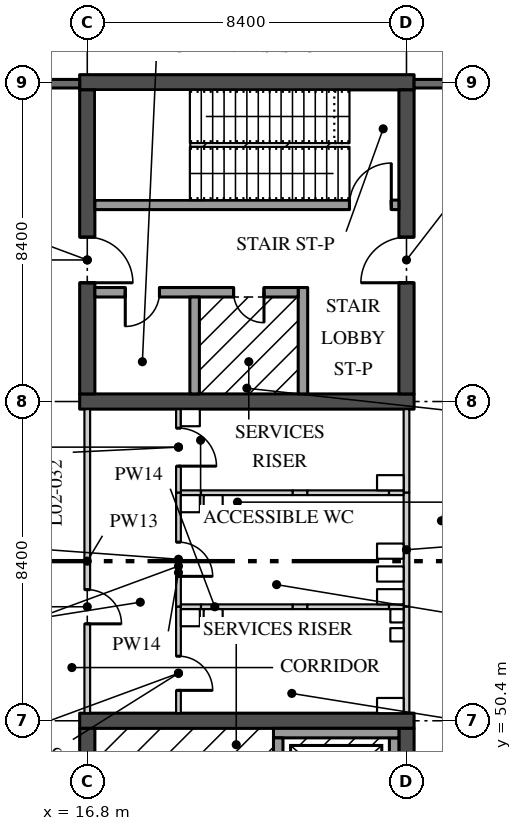
"""IFC4 building model, lengths in metres.
Left out: names, types, materials, properties, quantities, classifications, styles, units other than length and angle.
Written with IfcOpenShell. Run it as: python <this file> out.ifc"""

import sys

from ifc_helpers import new_model, si_unit, direction, frame, frame_2d, origin, place, context, subcontext, project, spatial, rectangle, extrude, element, fill, save


model = new_model("IFC4")
c1 = context("Model", 3, precision=1e-05, world=origin(), true_north=direction((0.0, 1.0)))
c2 = subcontext(c1, "Body", "Model", "MODEL_VIEW")
j1 = project(units=[si_unit("LENGTHUNIT", "METRE"), si_unit("PLANEANGLEUNIT", "RADIAN")], contexts=[c1])
p1 = place(None, origin())
s1 = spatial("IfcSite", under=j1, at=p1, CompositionType="ELEMENT")
p2 = place(p1, origin())
s2 = spatial("IfcBuilding", under=s1, at=p2, CompositionType="ELEMENT")
p3 = place(p2, frame((0.0, 0.0, 9.9)))
s3 = spatial("IfcBuildingStorey", under=s2, at=p3, CompositionType="ELEMENT", Elevation=9.9)
p4 = place(p3, frame((16.6, 50.4, 0.0), z_axis=(0.0, 0.0, 1.0), x_axis=(1.0, 0.0, 0.0)))
e1 = element("IfcWall", 1, at=p4, inside=s3, PredefinedType="SHEAR", context=c2, shape_type="SweptSolid", body=[
    extrude(rectangle(XDim=8.8, YDim=0.4, at=frame_2d((4.4, 0.0))), origin(), (0.0, 0.0, 1.0), 4.37),
])
p5 = place(p3, frame((16.8, 42.2, 0.0), z_axis=(0.0, 0.0, 1.0), x_axis=(0.0, 1.0, 0.0)))
e2 = element("IfcWall", 2, at=p5, inside=s3, PredefinedType="SHEAR", context=c2, shape_type="SweptSolid", body=[
    extrude(rectangle(XDim=8.0, YDim=0.4, at=frame_2d((4.0, 0.0))), origin(), (0.0, 0.0, 1.0), 4.37),
])
p6 = place(p5, frame((3.55, 0.0, 0.0)))
e3 = element("IfcOpeningElement", 3, at=p6, cuts=e2, PredefinedType="OPENING", context=c2, shape_type="SweptSolid", body=[
    extrude(rectangle(XDim=1.2, YDim=2.1, at=frame_2d((0.6, 1.05))), frame((0.0, 0.21, 0.0), z_axis=(0.0, -1.0, 0.0), x_axis=(1.0, 0.0, 0.0)), (0.0, 0.0, 1.0), 0.42),
])
p7 = place(p5, frame((0.8, 0.0, 0.0)))
e4 = element("IfcOpeningElement", 4, at=p7, cuts=e2, PredefinedType="OPENING", context=c2, shape_type="SweptSolid", body=[
    extrude(rectangle(XDim=1.2, YDim=2.1, at=frame_2d((0.6, 1.05))), frame((0.0, 0.21, 0.0), z_axis=(0.0, -1.0, 0.0), x_axis=(1.0, 0.0, 0.0)), (0.0, 0.0, 1.0), 0.42),
])
p8 = place(p3, frame((25.2, 42.2, 0.0), z_axis=(0.0, 0.0, 1.0), x_axis=(0.0, 1.0, 0.0)))
e5 = element("IfcWall", 5, at=p8, inside=s3, PredefinedType="SHEAR", context=c2, shape_type="SweptSolid", body=[
    extrude(rectangle(XDim=8.0, YDim=0.4, at=frame_2d((4.0, 0.0))), origin(), (0.0, 0.0, 1.0), 4.37),
])
p9 = place(p8, frame((3.55, 0.0, 0.0)))
e6 = element("IfcOpeningElement", 6, at=p9, cuts=e5, PredefinedType="OPENING", context=c2, shape_type="SweptSolid", body=[
    extrude(rectangle(XDim=1.2, YDim=2.1, at=frame_2d((0.6, 1.05))), frame((0.0, 0.21, 0.0), z_axis=(0.0, -1.0, 0.0), x_axis=(1.0, 0.0, 0.0)), (0.0, 0.0, 1.0), 0.42),
])
for number, where, z_axis, x_axis in (
    (7, (16.6, 58.8, 0.0), (0.0, 0.0, 1.0), (1.0, 0.0, 0.0)),
    (8, (16.6, 67.2, 0.0), (0.0, 0.0, 1.0), (1.0, 0.0, 0.0)),
):
    element("IfcWall", number, at=place(p3, frame(where, z_axis=z_axis, x_axis=x_axis)), inside=s3, PredefinedType="SHEAR", context=c2, shape_type="SweptSolid", body=[
        extrude(rectangle(XDim=8.8, YDim=0.4, at=frame_2d((4.4, 0.0))), origin(), (0.0, 0.0, 1.0), 4.37),
    ])
p10 = place(p3, frame((16.8, 59.0, 0.0), z_axis=(0.0, 0.0, 1.0), x_axis=(0.0, 1.0, 0.0)))
e9 = element("IfcWall", 9, at=p10, inside=s3, PredefinedType="SHEAR", context=c2, shape_type="SweptSolid", body=[
    extrude(rectangle(XDim=8.0, YDim=0.4, at=frame_2d((4.0, 0.0))), origin(), (0.0, 0.0, 1.0), 4.37),
])
p11 = place(p10, frame((2.925, 0.0, 0.0)))
e10 = element("IfcOpeningElement", 10, at=p11, cuts=e9, PredefinedType="OPENING", context=c2, shape_type="SweptSolid", body=[
    extrude(rectangle(XDim=1.2, YDim=2.1, at=frame_2d((0.6, 1.05))), frame((0.0, 0.21, 0.0), z_axis=(0.0, -1.0, 0.0), x_axis=(1.0, 0.0, 0.0)), (0.0, 0.0, 1.0), 0.42),
])
p12 = place(p3, frame((25.2, 59.0, 0.0), z_axis=(0.0, 0.0, 1.0), x_axis=(0.0, 1.0, 0.0)))
e11 = element("IfcWall", 11, at=p12, inside=s3, PredefinedType="SHEAR", context=c2, shape_type="SweptSolid", body=[
    extrude(rectangle(XDim=8.0, YDim=0.4, at=frame_2d((4.0, 0.0))), origin(), (0.0, 0.0, 1.0), 4.37),
])
p13 = place(p12, frame((2.925, 0.0, 0.0)))
e12 = element("IfcOpeningElement", 12, at=p13, cuts=e11, PredefinedType="OPENING", context=c2, shape_type="SweptSolid", body=[
    extrude(rectangle(XDim=1.2, YDim=2.1, at=frame_2d((0.6, 1.05))), frame((0.0, 0.21, 0.0), z_axis=(0.0, -1.0, 0.0), x_axis=(1.0, 0.0, 0.0)), (0.0, 0.0, 1.0), 0.42),
])
p14 = place(p3, frame((25.0, 63.975, 0.0), z_axis=(0.0, 0.0, 1.0), x_axis=(-1.0, 0.0, 0.0)))
e13 = element("IfcWall", 13, at=p14, inside=s3, PredefinedType="SOLIDWALL", context=c2, shape_type="SweptSolid", body=[
    extrude(rectangle(XDim=8.0, YDim=0.25, at=frame_2d((4.0, 0.0))), origin(), (0.0, 0.0, 1.0), 4.37),
])
p15 = place(p14, frame((0.2, 0.0, 0.0)))
e14 = element("IfcOpeningElement", 14, at=p15, cuts=e13, PredefinedType="OPENING", context=c2, shape_type="SweptSolid", body=[
    extrude(rectangle(XDim=1.1, YDim=2.1, at=frame_2d((0.55, 1.05))), frame((0.0, 0.135, 0.0), z_axis=(0.0, -1.0, 0.0), x_axis=(1.0, 0.0, 0.0)), (0.0, 0.0, 1.0), 0.27),
])
p16 = place(p3, frame((22.475, 61.8, 0.0), z_axis=(0.0, 0.0, 1.0), x_axis=(0.0, -1.0, 0.0)))
e15 = element("IfcWall", 15, at=p16, inside=s3, PredefinedType="SOLIDWALL", context=c2, shape_type="SweptSolid", body=[
    extrude(rectangle(XDim=2.8, YDim=0.25, at=frame_2d((1.4, 0.0))), origin(), (0.0, 0.0, 1.0), 4.37),
])
p17 = place(p3, frame((22.35, 61.675, 0.0), z_axis=(0.0, 0.0, 1.0), x_axis=(-1.0, 0.0, 0.0)))
e16 = element("IfcWall", 16, at=p17, inside=s3, PredefinedType="SOLIDWALL", context=c2, shape_type="SweptSolid", body=[
    extrude(rectangle(XDim=5.35, YDim=0.25, at=frame_2d((2.675, 0.0))), origin(), (0.0, 0.0, 1.0), 4.37),
])
p18 = place(p17, frame((3.65, 0.0, 0.0)))
e17 = element("IfcOpeningElement", 17, at=p18, cuts=e16, PredefinedType="OPENING", context=c2, shape_type="SweptSolid", body=[
    extrude(rectangle(XDim=0.9, YDim=2.1, at=frame_2d((0.45, 1.05))), frame((0.0, 0.135, 0.0), z_axis=(0.0, -1.0, 0.0), x_axis=(1.0, 0.0, 0.0)), (0.0, 0.0, 1.0), 0.27),
])
p19 = place(p17, frame((0.9, 0.0, 0.0)))
e18 = element("IfcOpeningElement", 18, at=p19, cuts=e16, PredefinedType="OPENING", context=c2, shape_type="SweptSolid", body=[
    extrude(rectangle(XDim=0.8, YDim=2.1, at=frame_2d((0.4, 1.05))), frame((0.0, 0.135, 0.0), z_axis=(0.0, -1.0, 0.0), x_axis=(1.0, 0.0, 0.0)), (0.0, 0.0, 1.0), 0.27),
])
p20 = place(p3, frame((19.625, 61.55, 0.0), z_axis=(0.0, 0.0, 1.0), x_axis=(0.0, -1.0, 0.0)))
e19 = element("IfcWall", 19, at=p20, inside=s3, PredefinedType="SOLIDWALL", context=c2, shape_type="SweptSolid", body=[
    extrude(rectangle(XDim=2.55, YDim=0.25, at=frame_2d((1.275, 0.0))), origin(), (0.0, 0.0, 1.0), 4.37),
])
p21 = place(p3, frame((24.875, 47.65, 0.0), z_axis=(0.0, 0.0, 1.0), x_axis=(0.0, 1.0, 0.0)))
e20 = element("IfcWall", 20, at=p21, inside=s3, PredefinedType="SOLIDWALL", context=c2, shape_type="SweptSolid", body=[
    extrude(rectangle(XDim=2.3, YDim=0.25, at=frame_2d((1.15, 0.0))), origin(), (0.0, 0.0, 1.0), 4.37),
])
p22 = place(p3, frame((21.7, 50.075, 0.0), z_axis=(0.0, 0.0, 1.0), x_axis=(1.0, 0.0, 0.0)))
e21 = element("IfcWall", 21, at=p22, inside=s3, PredefinedType="SOLIDWALL", context=c2, shape_type="SweptSolid", body=[
    extrude(rectangle(XDim=3.3, YDim=0.25, at=frame_2d((1.65, 0.0))), origin(), (0.0, 0.0, 1.0), 4.37),
])
p23 = place(p3, frame((21.825, 47.65, 0.0), z_axis=(0.0, 0.0, 1.0), x_axis=(0.0, 1.0, 0.0)))
e22 = element("IfcWall", 22, at=p23, inside=s3, PredefinedType="SOLIDWALL", context=c2, shape_type="SweptSolid", body=[
    extrude(rectangle(XDim=2.3, YDim=0.25, at=frame_2d((1.15, 0.0))), origin(), (0.0, 0.0, 1.0), 4.37),
])
p24 = place(p3, frame((25.2, 56.4, 0.0), z_axis=(0.0, 0.0, 1.0), x_axis=(0.0, 1.0, 0.0)))
e23 = element("IfcWall", 23, at=p24, inside=s3, PredefinedType="PARTITIONING", context=c2, shape_type="SweptSolid", body=[
    extrude(rectangle(XDim=2.2, YDim=0.15, at=frame_2d((1.1, 0.0))), origin(), (0.0, 0.0, 1.0), 3.746),
])
p25 = place(p3, frame((25.2, 53.4, 0.0), z_axis=(0.0, 0.0, 1.0), x_axis=(0.0, 1.0, 0.0)))
e24 = element("IfcWall", 24, at=p25, inside=s3, PredefinedType="PARTITIONING", context=c2, shape_type="SweptSolid", body=[
    extrude(rectangle(XDim=3.0, YDim=0.15, at=frame_2d((1.5, 0.0))), origin(), (0.0, 0.0, 1.0), 3.746),
])
p26 = place(p3, frame((25.2, 50.6, 0.0), z_axis=(0.0, 0.0, 1.0), x_axis=(0.0, 1.0, 0.0)))
e25 = element("IfcWall", 25, at=p26, inside=s3, PredefinedType="PARTITIONING", context=c2, shape_type="SweptSolid", body=[
    extrude(rectangle(XDim=2.8, YDim=0.15, at=frame_2d((1.4, 0.0))), origin(), (0.0, 0.0, 1.0), 3.746),
])
p27 = place(p3, frame((16.8, 50.6, 0.0), z_axis=(0.0, 0.0, 1.0), x_axis=(0.0, 1.0, 0.0)))
e26 = element("IfcWall", 26, at=p27, inside=s3, PredefinedType="PARTITIONING", context=c2, shape_type="SweptSolid", body=[
    extrude(rectangle(XDim=8.0, YDim=0.15, at=frame_2d((4.0, 0.0))), origin(), (0.0, 0.0, 1.0), 3.746),
])
p28 = place(p27, frame((2.35, 0.0, 0.0)))
e27 = element("IfcOpeningElement", 27, at=p28, cuts=e26, PredefinedType="OPENING", context=c2, shape_type="SweptSolid", body=[
    extrude(rectangle(XDim=0.9, YDim=2.1, at=frame_2d((0.45, 1.05))), frame((0.0, 0.085, 0.0), z_axis=(0.0, -1.0, 0.0), x_axis=(1.0, 0.0, 0.0)), (0.0, 0.0, 1.0), 0.17),
])
p29 = place(p3, frame((19.262, 56.4, 0.0), z_axis=(0.0, 0.0, 1.0), x_axis=(1.0, 0.0, 0.0)))
e28 = element("IfcWall", 28, at=p29, inside=s3, PredefinedType="PARTITIONING", context=c2, shape_type="SweptSolid", body=[
    extrude(rectangle(XDim=0.531, YDim=0.125, at=frame_2d((0.266, 0.0))), origin(), (0.0, 0.0, 1.0), 3.895),
])
p30 = place(p3, frame((19.793, 56.4, 0.0), z_axis=(0.0, 0.0, 1.0), x_axis=(1.0, 0.0, 0.0)))
e29 = element("IfcWall", 29, at=p30, inside=s3, PredefinedType="PARTITIONING", context=c2, shape_type="SweptSolid", body=[
    extrude(rectangle(XDim=2.414, YDim=0.125, at=frame_2d((1.207, 0.0))), origin(), (0.0, 0.0, 1.0), 4.37),
])
p31 = place(p3, frame((22.207, 56.4, 0.0), z_axis=(0.0, 0.0, 1.0), x_axis=(1.0, 0.0, 0.0)))
e30 = element("IfcWall", 30, at=p31, inside=s3, PredefinedType="PARTITIONING", context=c2, shape_type="SweptSolid", body=[
    extrude(rectangle(XDim=0.385, YDim=0.125, at=frame_2d((0.192, 0.0))), origin(), (0.0, 0.0, 1.0), 3.895),
])
p32 = place(p3, frame((22.592, 56.4, 0.0), z_axis=(0.0, 0.0, 1.0), x_axis=(1.0, 0.0, 0.0)))
e31 = element("IfcWall", 31, at=p32, inside=s3, PredefinedType="PARTITIONING", context=c2, shape_type="SweptSolid", body=[
    extrude(rectangle(XDim=2.148, YDim=0.125, at=frame_2d((1.074, 0.0))), origin(), (0.0, 0.0, 1.0), 4.37),
])
p33 = place(p3, frame((24.74, 56.4, 0.0), z_axis=(0.0, 0.0, 1.0), x_axis=(1.0, 0.0, 0.0)))
e32 = element("IfcWall", 32, at=p33, inside=s3, PredefinedType="PARTITIONING", context=c2, shape_type="SweptSolid", body=[
    extrude(rectangle(XDim=0.385, YDim=0.125, at=frame_2d((0.192, 0.0))), origin(), (0.0, 0.0, 1.0), 3.746),
])
p34 = place(p3, frame((19.2, 56.4, 0.0), z_axis=(0.0, 0.0, 1.0), x_axis=(0.0, 1.0, 0.0)))
e33 = element("IfcWall", 33, at=p34, inside=s3, PredefinedType="PARTITIONING", context=c2, shape_type="SweptSolid", body=[
    extrude(rectangle(XDim=2.2, YDim=0.125, at=frame_2d((1.1, 0.0))), origin(), (0.0, 0.0, 1.0), 4.37),
])
p35 = place(p34, frame((0.7, 0.0, 0.0)))
e34 = element("IfcOpeningElement", 34, at=p35, cuts=e33, PredefinedType="OPENING", context=c2, shape_type="SweptSolid", body=[
    extrude(rectangle(XDim=1.0, YDim=2.1, at=frame_2d((0.5, 1.05))), frame((0.0, 0.073, 0.0), z_axis=(0.0, -1.0, 0.0), x_axis=(1.0, 0.0, 0.0)), (0.0, 0.0, 1.0), 0.145),
])
p36 = place(p3, frame((19.2, 53.4, 0.0), z_axis=(0.0, 0.0, 1.0), x_axis=(0.0, 1.0, 0.0)))
e35 = element("IfcWall", 35, at=p36, inside=s3, PredefinedType="PARTITIONING", context=c2, shape_type="SweptSolid", body=[
    extrude(rectangle(XDim=3.0, YDim=0.125, at=frame_2d((1.5, 0.0))), origin(), (0.0, 0.0, 1.0), 4.37),
])
p37 = place(p36, frame((0.8, 0.0, 0.0)))
e36 = element("IfcOpeningElement", 36, at=p37, cuts=e35, PredefinedType="OPENING", context=c2, shape_type="SweptSolid", body=[
    extrude(rectangle(XDim=0.9, YDim=2.1, at=frame_2d((0.45, 1.05))), frame((0.0, 0.073, 0.0), z_axis=(0.0, -1.0, 0.0), x_axis=(1.0, 0.0, 0.0)), (0.0, 0.0, 1.0), 0.145),
])
p38 = place(p3, frame((19.262, 53.4, 0.0), z_axis=(0.0, 0.0, 1.0), x_axis=(1.0, 0.0, 0.0)))
e37 = element("IfcWall", 37, at=p38, inside=s3, PredefinedType="PARTITIONING", context=c2, shape_type="SweptSolid", body=[
    extrude(rectangle(XDim=0.531, YDim=0.125, at=frame_2d((0.266, 0.0))), origin(), (0.0, 0.0, 1.0), 3.895),
])
p39 = place(p3, frame((19.793, 53.4, 0.0), z_axis=(0.0, 0.0, 1.0), x_axis=(1.0, 0.0, 0.0)))
e38 = element("IfcWall", 38, at=p39, inside=s3, PredefinedType="PARTITIONING", context=c2, shape_type="SweptSolid", body=[
    extrude(rectangle(XDim=2.414, YDim=0.125, at=frame_2d((1.207, 0.0))), origin(), (0.0, 0.0, 1.0), 4.37),
])
p40 = place(p3, frame((22.207, 53.4, 0.0), z_axis=(0.0, 0.0, 1.0), x_axis=(1.0, 0.0, 0.0)))
e39 = element("IfcWall", 39, at=p40, inside=s3, PredefinedType="PARTITIONING", context=c2, shape_type="SweptSolid", body=[
    extrude(rectangle(XDim=0.385, YDim=0.125, at=frame_2d((0.192, 0.0))), origin(), (0.0, 0.0, 1.0), 3.895),
])
p41 = place(p3, frame((22.592, 53.4, 0.0), z_axis=(0.0, 0.0, 1.0), x_axis=(1.0, 0.0, 0.0)))
e40 = element("IfcWall", 40, at=p41, inside=s3, PredefinedType="PARTITIONING", context=c2, shape_type="SweptSolid", body=[
    extrude(rectangle(XDim=2.148, YDim=0.125, at=frame_2d((1.074, 0.0))), origin(), (0.0, 0.0, 1.0), 4.37),
])
p42 = place(p3, frame((24.74, 53.4, 0.0), z_axis=(0.0, 0.0, 1.0), x_axis=(1.0, 0.0, 0.0)))
e41 = element("IfcWall", 41, at=p42, inside=s3, PredefinedType="PARTITIONING", context=c2, shape_type="SweptSolid", body=[
    extrude(rectangle(XDim=0.385, YDim=0.125, at=frame_2d((0.192, 0.0))), origin(), (0.0, 0.0, 1.0), 3.746),
])
p43 = place(p3, frame((19.2, 50.6, 0.0), z_axis=(0.0, 0.0, 1.0), x_axis=(0.0, 1.0, 0.0)))
e42 = element("IfcWall", 42, at=p43, inside=s3, PredefinedType="PARTITIONING", context=c2, shape_type="SweptSolid", body=[
    extrude(rectangle(XDim=2.8, YDim=0.125, at=frame_2d((1.4, 0.0))), origin(), (0.0, 0.0, 1.0), 4.37),
])
p44 = place(p43, frame((0.6, 0.0, 0.0)))
e43 = element("IfcOpeningElement", 43, at=p44, cuts=e42, PredefinedType="OPENING", context=c2, shape_type="SweptSolid", body=[
    extrude(rectangle(XDim=0.9, YDim=2.1, at=frame_2d((0.45, 1.05))), frame((0.0, 0.073, 0.0), z_axis=(0.0, -1.0, 0.0), x_axis=(1.0, 0.0, 0.0)), (0.0, 0.0, 1.0), 0.145),
])
for number, where, z_axis, x_axis in (
    (44, (33.596, 67.163, 0.0), (0.0, 0.0, 1.0), (-1.0, 0.0, 0.0)),
    (45, (16.6, 67.163, 0.0), (0.0, 0.0, 1.0), (-1.0, 0.0, 0.0)),
):
    element("IfcWall", number, at=place(p3, frame(where, z_axis=z_axis, x_axis=x_axis)), inside=s3, PredefinedType="SOLIDWALL", context=c2, shape_type="SweptSolid", body=[
        extrude(rectangle(XDim=8.196, YDim=0.225, at=frame_2d((4.098, 0.0))), origin(), (0.0, 0.0, 1.0), 3.746),
    ])
p45 = place(p18, origin())
e46 = element("IfcDoor", 46, at=p45, inside=s3, OperationType="SINGLE_SWING_LEFT", PredefinedType="DOOR", context=c2, shape_type="SweptSolid", body=[
    extrude(rectangle(XDim=0.9, YDim=2.1, at=frame_2d((0.45, 1.05))), frame((0.0, 0.035, 0.0), z_axis=(0.0, -1.0, 0.0), x_axis=(1.0, 0.0, 0.0)), (0.0, 0.0, 1.0), 0.07),
])
fill(e17, e46)
p46 = place(p11, frame((1.2, 0.0, 0.0), z_axis=(0.0, 0.0, 1.0), x_axis=(-1.0, 0.0, 0.0)))
e47 = element("IfcDoor", 47, at=p46, inside=s3, OperationType="SINGLE_SWING_LEFT", PredefinedType="DOOR", context=c2, shape_type="SweptSolid", body=[
    extrude(rectangle(XDim=1.2, YDim=2.1, at=frame_2d((0.6, 1.05))), frame((0.0, 0.035, 0.0), z_axis=(0.0, -1.0, 0.0), x_axis=(1.0, 0.0, 0.0)), (0.0, 0.0, 1.0), 0.07),
])
fill(e10, e47)
p47 = place(p13, origin())
e48 = element("IfcDoor", 48, at=p47, inside=s3, OperationType="SINGLE_SWING_RIGHT", PredefinedType="DOOR", context=c2, shape_type="SweptSolid", body=[
    extrude(rectangle(XDim=1.2, YDim=2.1, at=frame_2d((0.6, 1.05))), frame((0.0, 0.035, 0.0), z_axis=(0.0, -1.0, 0.0), x_axis=(1.0, 0.0, 0.0)), (0.0, 0.0, 1.0), 0.07),
])
fill(e12, e48)
p48 = place(p19, origin())
e49 = element("IfcDoor", 49, at=p48, inside=s3, OperationType="SINGLE_SWING_RIGHT", PredefinedType="DOOR", context=c2, shape_type="SweptSolid", body=[
    extrude(rectangle(XDim=0.8, YDim=2.1, at=frame_2d((0.4, 1.05))), frame((0.0, 0.035, 0.0), z_axis=(0.0, -1.0, 0.0), x_axis=(1.0, 0.0, 0.0)), (0.0, 0.0, 1.0), 0.07),
])
fill(e18, e49)
p49 = place(p15, frame((1.1, 0.0, 0.0), z_axis=(0.0, 0.0, 1.0), x_axis=(-1.0, 0.0, 0.0)))
e50 = element("IfcDoor", 50, at=p49, inside=s3, OperationType="SINGLE_SWING_LEFT", PredefinedType="DOOR", context=c2, shape_type="SweptSolid", body=[
    extrude(rectangle(XDim=1.1, YDim=2.1, at=frame_2d((0.55, 1.05))), frame((0.0, 0.035, 0.0), z_axis=(0.0, -1.0, 0.0), x_axis=(1.0, 0.0, 0.0)), (0.0, 0.0, 1.0), 0.07),
])
fill(e14, e50)
p50 = place(p35, frame((1.0, 0.0, 0.0), z_axis=(0.0, 0.0, 1.0), x_axis=(-1.0, 0.0, 0.0)))
e51 = element("IfcDoor", 51, at=p50, inside=s3, OperationType="SINGLE_SWING_LEFT", PredefinedType="DOOR", context=c2, shape_type="SweptSolid", body=[
    extrude(rectangle(XDim=1.0, YDim=2.1, at=frame_2d((0.5, 1.05))), frame((0.0, 0.02, 0.0), z_axis=(0.0, -1.0, 0.0), x_axis=(1.0, 0.0, 0.0)), (0.0, 0.0, 1.0), 0.04),
])
fill(e34, e51)
p51 = place(p37, frame((0.9, 0.0, 0.0), z_axis=(0.0, 0.0, 1.0), x_axis=(-1.0, 0.0, 0.0)))
e52 = element("IfcDoor", 52, at=p51, inside=s3, OperationType="SINGLE_SWING_LEFT", PredefinedType="DOOR", context=c2, shape_type="SweptSolid", body=[
    extrude(rectangle(XDim=0.9, YDim=2.1, at=frame_2d((0.45, 1.05))), frame((0.0, 0.02, 0.0), z_axis=(0.0, -1.0, 0.0), x_axis=(1.0, 0.0, 0.0)), (0.0, 0.0, 1.0), 0.04),
])
fill(e36, e52)
p52 = place(p28, frame((0.9, 0.0, 0.0), z_axis=(0.0, 0.0, 1.0), x_axis=(-1.0, 0.0, 0.0)))
e53 = element("IfcDoor", 53, at=p52, inside=s3, OperationType="SINGLE_SWING_LEFT", PredefinedType="DOOR", context=c2, shape_type="SweptSolid", body=[
    extrude(rectangle(XDim=0.9, YDim=2.1, at=frame_2d((0.45, 1.05))), frame((0.0, 0.025, 0.0), z_axis=(0.0, -1.0, 0.0), x_axis=(1.0, 0.0, 0.0)), (0.0, 0.0, 1.0), 0.05),
])
fill(e27, e53)
p53 = place(p44, frame((0.9, 0.0, 0.0), z_axis=(0.0, 0.0, 1.0), x_axis=(-1.0, 0.0, 0.0)))
e54 = element("IfcDoor", 54, at=p53, inside=s3, OperationType="SINGLE_SWING_LEFT", PredefinedType="DOOR", context=c2, shape_type="SweptSolid", body=[
    extrude(rectangle(XDim=0.9, YDim=2.1, at=frame_2d((0.45, 1.05))), frame((0.0, 0.02, 0.0), z_axis=(0.0, -1.0, 0.0), x_axis=(1.0, 0.0, 0.0)), (0.0, 0.0, 1.0), 0.04),
])
fill(e43, e54)
save(model, sys.argv[1])
